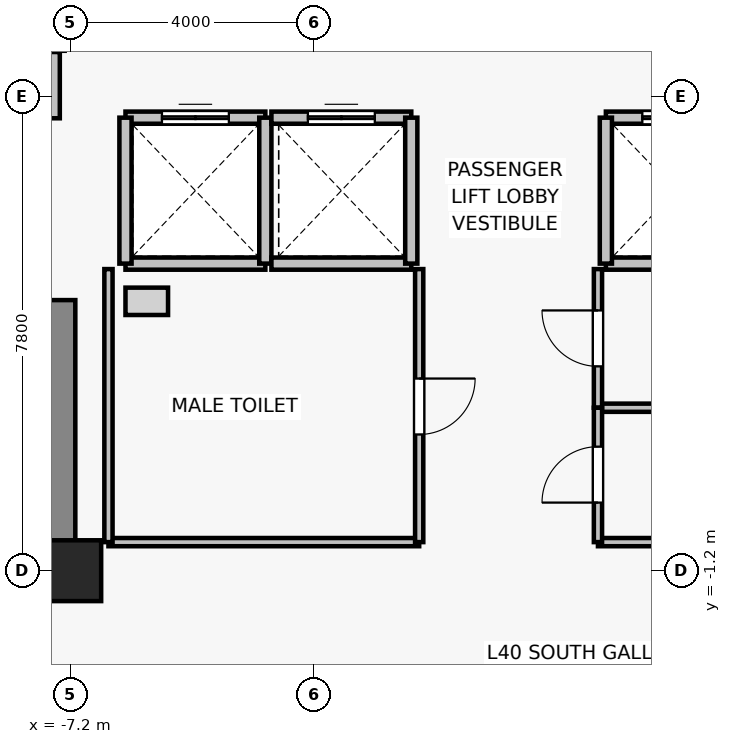
"""IFC4 building model, lengths in metres.
Left out: names, types, materials, properties, quantities, classifications, styles, units other than length and angle.
Written with IfcOpenShell. Run it as: python <this file> out.ifc"""

import sys

from ifc_helpers import new_model, si_unit, direction, frame, frame_2d, origin, origin_2d, place, context, subcontext, project, spatial, rectangle, extrude, source, transform, mapped, element, fill, save


model = new_model("IFC4")
c1 = context("Model", 3, precision=1e-05, world=origin(), true_north=direction((0.0, 1.0)))
c2 = subcontext(c1, "Body", "Model", "MODEL_VIEW")
j1 = project(units=[si_unit("LENGTHUNIT", "METRE"), si_unit("PLANEANGLEUNIT", "RADIAN")], contexts=[c1])
p1 = place(None, origin())
s1 = spatial("IfcSite", under=j1, at=p1, CompositionType="ELEMENT")
p2 = place(p1, origin())
s2 = spatial("IfcBuilding", under=s1, at=p2, CompositionType="ELEMENT")
p3 = place(p2, frame((0.0, 0.0, 146.2)))
s3 = spatial("IfcBuildingStorey", under=s2, at=p3, CompositionType="ELEMENT", Elevation=146.2)
p4 = place(p3, frame((-7.2, -1.2, 0.0), z_axis=(0.0, 0.0, 1.0), x_axis=(1.0, 0.0, 0.0)))
e1 = element("IfcColumn", 1, at=p4, inside=s3, PredefinedType="COLUMN", context=c2, shape_type="SweptSolid", body=[
    extrude(rectangle(XDim=1.0, YDim=1.0, at=origin_2d()), origin(), (0.0, 0.0, 1.0), 3.3),
])
p5 = place(p3, frame((-7.4, -0.825, 0.0), z_axis=(0.0, 0.0, 1.0), x_axis=(0.0, 1.0, 0.0)))
e2 = element("IfcWall", 2, at=p5, inside=s3, PredefinedType="SHEAR", context=c2, shape_type="SweptSolid", body=[
    extrude(rectangle(XDim=4.075, YDim=0.55, at=frame_2d((2.038, 0.0))), origin(), (0.0, 0.0, 1.0), 3.075),
])
p6 = place(p3, frame((-4.0, 3.85, 0.0), z_axis=(0.0, 0.0, 1.0), x_axis=(-1.0, 0.0, 0.0)))
e3 = element("IfcWall", 3, at=p6, inside=s3, PredefinedType="SOLIDWALL", context=c2, shape_type="SweptSolid", body=[
    extrude(rectangle(XDim=2.3, YDim=0.2, at=frame_2d((1.15, 0.0))), origin(), (0.0, 0.0, 1.0), 3.075),
])
p7 = place(p3, frame((-6.3, 6.25, 0.0), z_axis=(0.0, 0.0, 1.0), x_axis=(1.0, 0.0, 0.0)))
e4 = element("IfcWall", 4, at=p7, inside=s3, PredefinedType="SOLIDWALL", context=c2, shape_type="SweptSolid", body=[
    extrude(rectangle(XDim=2.3, YDim=0.2, at=frame_2d((1.15, 0.0))), origin(), (0.0, 0.0, 1.0), 3.075),
])
p8 = place(p7, frame((0.6, 0.0, 0.0)))
e5 = element("IfcOpeningElement", 5, at=p8, cuts=e4, PredefinedType="OPENING", context=c2, shape_type="SweptSolid", body=[
    extrude(rectangle(XDim=1.1, YDim=2.2, at=frame_2d((0.55, 1.1))), frame((0.0, 0.11, 0.0), z_axis=(0.0, -1.0, 0.0), x_axis=(1.0, 0.0, 0.0)), (0.0, 0.0, 1.0), 0.22),
])
for number, where, z_axis, x_axis in (
    (6, (-6.3, 3.85, 0.0), (0.0, 0.0, 1.0), (0.0, 1.0, 0.0)),
    (7, (-4.0, 6.25, 0.0), (0.0, 0.0, 1.0), (0.0, -1.0, 0.0)),
):
    element("IfcWall", number, at=place(p3, frame(where, z_axis=z_axis, x_axis=x_axis)), inside=s3, PredefinedType="SOLIDWALL", context=c2, shape_type="SweptSolid", body=[
        extrude(rectangle(XDim=2.4, YDim=0.2, at=frame_2d((1.2, 0.0))), origin(), (0.0, 0.0, 1.0), 3.075),
    ])
p9 = place(p3, frame((-1.6, 3.85, 0.0), z_axis=(0.0, 0.0, 1.0), x_axis=(-1.0, 0.0, 0.0)))
e8 = element("IfcWall", 8, at=p9, inside=s3, PredefinedType="SOLIDWALL", context=c2, shape_type="SweptSolid", body=[
    extrude(rectangle(XDim=2.3, YDim=0.2, at=frame_2d((1.15, 0.0))), origin(), (0.0, 0.0, 1.0), 3.075),
])
p10 = place(p3, frame((-3.9, 6.25, 0.0), z_axis=(0.0, 0.0, 1.0), x_axis=(1.0, 0.0, 0.0)))
e9 = element("IfcWall", 9, at=p10, inside=s3, PredefinedType="SOLIDWALL", context=c2, shape_type="SweptSolid", body=[
    extrude(rectangle(XDim=2.3, YDim=0.2, at=frame_2d((1.15, 0.0))), origin(), (0.0, 0.0, 1.0), 3.075),
])
p11 = place(p10, frame((0.6, 0.0, 0.0)))
e10 = element("IfcOpeningElement", 10, at=p11, cuts=e9, PredefinedType="OPENING", context=c2, shape_type="SweptSolid", body=[
    extrude(rectangle(XDim=1.1, YDim=2.2, at=frame_2d((0.55, 1.1))), frame((0.0, 0.11, 0.0), z_axis=(0.0, -1.0, 0.0), x_axis=(1.0, 0.0, 0.0)), (0.0, 0.0, 1.0), 0.22),
])
p12 = place(p3, frame((-1.6, 6.25, 0.0), z_axis=(0.0, 0.0, 1.0), x_axis=(0.0, -1.0, 0.0)))
e11 = element("IfcWall", 11, at=p12, inside=s3, PredefinedType="SOLIDWALL", context=c2, shape_type="SweptSolid", body=[
    extrude(rectangle(XDim=2.4, YDim=0.2, at=frame_2d((1.2, 0.0))), origin(), (0.0, 0.0, 1.0), 3.075),
])
p13 = place(p3, frame((3.9, 3.85, 0.0), z_axis=(0.0, 0.0, 1.0), x_axis=(-1.0, 0.0, 0.0)))
e12 = element("IfcWall", 12, at=p13, inside=s3, PredefinedType="SOLIDWALL", context=c2, shape_type="SweptSolid", body=[
    extrude(rectangle(XDim=2.3, YDim=0.2, at=frame_2d((1.15, 0.0))), origin(), (0.0, 0.0, 1.0), 3.075),
])
p14 = place(p3, frame((1.6, 6.25, 0.0), z_axis=(0.0, 0.0, 1.0), x_axis=(1.0, 0.0, 0.0)))
e13 = element("IfcWall", 13, at=p14, inside=s3, PredefinedType="SOLIDWALL", context=c2, shape_type="SweptSolid", body=[
    extrude(rectangle(XDim=2.3, YDim=0.2, at=frame_2d((1.15, 0.0))), origin(), (0.0, 0.0, 1.0), 3.075),
])
p15 = place(p14, frame((0.6, 0.0, 0.0)))
e14 = element("IfcOpeningElement", 14, at=p15, cuts=e13, PredefinedType="OPENING", context=c2, shape_type="SweptSolid", body=[
    extrude(rectangle(XDim=1.1, YDim=2.2, at=frame_2d((0.55, 1.1))), frame((0.0, 0.11, 0.0), z_axis=(0.0, -1.0, 0.0), x_axis=(1.0, 0.0, 0.0)), (0.0, 0.0, 1.0), 0.22),
])
p16 = place(p3, frame((1.6, 3.85, 0.0), z_axis=(0.0, 0.0, 1.0), x_axis=(0.0, 1.0, 0.0)))
e15 = element("IfcWall", 15, at=p16, inside=s3, PredefinedType="SOLIDWALL", context=c2, shape_type="SweptSolid", body=[
    extrude(rectangle(XDim=2.4, YDim=0.2, at=frame_2d((1.2, 0.0))), origin(), (0.0, 0.0, 1.0), 3.075),
])
p17 = place(p3, frame((-7.4, 7.35, 0.0), z_axis=(0.0, 0.0, 1.0), x_axis=(-1.0, 0.0, 0.0)))
e16 = element("IfcWall", 16, at=p17, inside=s3, PredefinedType="SOLIDWALL", context=c2, shape_type="SweptSolid", body=[
    extrude(rectangle(XDim=2.2, YDim=0.2, at=frame_2d((1.1, 0.0))), origin(), (0.0, 0.0, 1.0), 2.565),
])
p18 = place(p3, frame((-7.47, 7.33, 0.0), z_axis=(0.0, 0.0, 1.0), x_axis=(0.0, -1.0, 0.0)))
e17 = element("IfcWall", 17, at=p18, inside=s3, PredefinedType="PARTITIONING", context=c2, shape_type="SweptSolid", body=[
    extrude(rectangle(XDim=1.09, YDim=0.18, at=frame_2d((0.545, 0.0))), origin(), (0.0, 0.0, 1.0), 2.565),
])
p19 = place(p3, frame((-1.47, -0.73, 0.0), z_axis=(0.0, 0.0, 1.0), x_axis=(-1.0, 0.0, 0.0)))
e18 = element("IfcWall", 18, at=p19, inside=s3, PredefinedType="PARTITIONING", context=c2, shape_type="SweptSolid", body=[
    extrude(rectangle(XDim=5.11, YDim=0.135, at=frame_2d((2.555, 0.0))), origin(), (0.0, 0.0, 1.0), 3.075),
])
p20 = place(p3, frame((-6.58, -0.73, 0.0), z_axis=(0.0, 0.0, 1.0), x_axis=(0.0, 1.0, 0.0)))
e19 = element("IfcWall", 19, at=p20, inside=s3, PredefinedType="PARTITIONING", context=c2, shape_type="SweptSolid", body=[
    extrude(rectangle(XDim=4.49, YDim=0.135, at=frame_2d((2.245, 0.0))), origin(), (0.0, 0.0, 1.0), 3.075),
])
p21 = place(p3, frame((-1.47, 3.76, 0.0), z_axis=(0.0, 0.0, 1.0), x_axis=(0.0, -1.0, 0.0)))
e20 = element("IfcWall", 20, at=p21, inside=s3, PredefinedType="PARTITIONING", context=c2, shape_type="SweptSolid", body=[
    extrude(rectangle(XDim=4.49, YDim=0.135, at=frame_2d((2.245, 0.0))), origin(), (0.0, 0.0, 1.0), 3.075),
])
p22 = place(p21, frame((1.8, 0.0, 0.0)))
e21 = element("IfcOpeningElement", 21, at=p22, cuts=e20, PredefinedType="OPENING", context=c2, shape_type="SweptSolid", body=[
    extrude(rectangle(XDim=0.92, YDim=2.1, at=frame_2d((0.46, 1.05))), frame((0.0, 0.077, 0.0), z_axis=(0.0, -1.0, 0.0), x_axis=(1.0, 0.0, 0.0)), (0.0, 0.0, 1.0), 0.155),
])
p23 = place(p3, frame((6.58, 1.48, 0.0), z_axis=(0.0, 0.0, 1.0), x_axis=(-1.0, 0.0, 0.0)))
e22 = element("IfcWall", 22, at=p23, inside=s3, PredefinedType="PARTITIONING", context=c2, shape_type="SweptSolid", body=[
    extrude(rectangle(XDim=5.11, YDim=0.135, at=frame_2d((2.555, 0.0))), origin(), (0.0, 0.0, 1.0), 3.075),
])
p24 = place(p3, frame((1.47, 1.48, 0.0), z_axis=(0.0, 0.0, 1.0), x_axis=(0.0, 1.0, 0.0)))
e23 = element("IfcWall", 23, at=p24, inside=s3, PredefinedType="PARTITIONING", context=c2, shape_type="SweptSolid", body=[
    extrude(rectangle(XDim=2.28, YDim=0.135, at=frame_2d((1.14, 0.0))), origin(), (0.0, 0.0, 1.0), 3.075),
])
p25 = place(p24, frame((0.68, 0.0, 0.0)))
e24 = element("IfcOpeningElement", 24, at=p25, cuts=e23, PredefinedType="OPENING", context=c2, shape_type="SweptSolid", body=[
    extrude(rectangle(XDim=0.92, YDim=2.1, at=frame_2d((0.46, 1.05))), frame((0.0, 0.077, 0.0), z_axis=(0.0, -1.0, 0.0), x_axis=(1.0, 0.0, 0.0)), (0.0, 0.0, 1.0), 0.155),
])
p26 = place(p3, frame((4.18, -0.73, 0.0), z_axis=(0.0, 0.0, 1.0), x_axis=(-1.0, 0.0, 0.0)))
e25 = element("IfcWall", 25, at=p26, inside=s3, PredefinedType="PARTITIONING", context=c2, shape_type="SweptSolid", body=[
    extrude(rectangle(XDim=2.71, YDim=0.135, at=frame_2d((1.355, 0.0))), origin(), (0.0, 0.0, 1.0), 3.075),
])
p27 = place(p3, frame((1.47, -0.73, 0.0), z_axis=(0.0, 0.0, 1.0), x_axis=(0.0, 1.0, 0.0)))
e26 = element("IfcWall", 26, at=p27, inside=s3, PredefinedType="PARTITIONING", context=c2, shape_type="SweptSolid", body=[
    extrude(rectangle(XDim=2.21, YDim=0.135, at=frame_2d((1.105, 0.0))), origin(), (0.0, 0.0, 1.0), 3.075),
])
p28 = place(p27, frame((0.65, 0.0, 0.0)))
e27 = element("IfcOpeningElement", 27, at=p28, cuts=e26, PredefinedType="OPENING", context=c2, shape_type="SweptSolid", body=[
    extrude(rectangle(XDim=0.92, YDim=2.1, at=frame_2d((0.46, 1.05))), frame((0.0, 0.077, 0.0), z_axis=(0.0, -1.0, 0.0), x_axis=(1.0, 0.0, 0.0)), (0.0, 0.0, 1.0), 0.155),
])
m1 = source(origin(), c2, "Body", "SweptSolid", [
    extrude(rectangle(XDim=1.1, YDim=2.2, at=frame_2d((0.55, 1.1))), frame((0.0, 0.025, 0.0), z_axis=(0.0, -1.0, 0.0), x_axis=(1.0, 0.0, 0.0)), (0.0, 0.0, 1.0), 0.05),
])
p29 = place(p8, origin())
e28 = element("IfcDoor", 28, at=p29, inside=s3, OperationType="DOUBLE_DOOR_SLIDING", PredefinedType="DOOR", context=c2, shape_type="MappedRepresentation", body=[
    mapped(m1, transform((0.0, 0.0, 0.0), x_axis=(1.0, 0.0, 0.0), y_axis=(0.0, 1.0, 0.0), z_axis=(0.0, 0.0, 1.0), scale=1.0)),
])
fill(e5, e28)
p30 = place(p11, origin())
e29 = element("IfcDoor", 29, at=p30, inside=s3, OperationType="DOUBLE_DOOR_SLIDING", PredefinedType="DOOR", context=c2, shape_type="MappedRepresentation", body=[
    mapped(m1, transform((0.0, 0.0, 0.0), x_axis=(1.0, 0.0, 0.0), y_axis=(0.0, 1.0, 0.0), z_axis=(0.0, 0.0, 1.0), scale=1.0)),
])
fill(e10, e29)
p31 = place(p15, origin())
e30 = element("IfcDoor", 30, at=p31, inside=s3, OperationType="DOUBLE_DOOR_SLIDING", PredefinedType="DOOR", context=c2, shape_type="MappedRepresentation", body=[
    mapped(m1, transform((0.0, 0.0, 0.0), x_axis=(1.0, 0.0, 0.0), y_axis=(0.0, 1.0, 0.0), z_axis=(0.0, 0.0, 1.0), scale=1.0)),
])
fill(e14, e30)
m2 = source(origin(), c2, "Body", "SweptSolid", [
    extrude(rectangle(XDim=0.92, YDim=2.1, at=frame_2d((0.46, 1.05))), frame((0.0, 0.025, 0.0), z_axis=(0.0, -1.0, 0.0), x_axis=(1.0, 0.0, 0.0)), (0.0, 0.0, 1.0), 0.05),
])
p32 = place(p22, origin())
e31 = element("IfcDoor", 31, at=p32, inside=s3, OperationType="SINGLE_SWING_LEFT", PredefinedType="DOOR", context=c2, shape_type="MappedRepresentation", body=[
    mapped(m2, transform((0.0, 0.0, 0.0), x_axis=(1.0, 0.0, 0.0), y_axis=(0.0, 1.0, 0.0), z_axis=(0.0, 0.0, 1.0), scale=1.0)),
])
fill(e21, e31)
p33 = place(p25, origin())
e32 = element("IfcDoor", 32, at=p33, inside=s3, OperationType="SINGLE_SWING_RIGHT", PredefinedType="DOOR", context=c2, shape_type="MappedRepresentation", body=[
    mapped(m2, transform((0.0, 0.0, 0.0), x_axis=(1.0, 0.0, 0.0), y_axis=(0.0, 1.0, 0.0), z_axis=(0.0, 0.0, 1.0), scale=1.0)),
])
fill(e24, e32)
p34 = place(p28, origin())
e33 = element("IfcDoor", 33, at=p34, inside=s3, OperationType="SINGLE_SWING_LEFT", PredefinedType="DOOR", context=c2, shape_type="MappedRepresentation", body=[
    mapped(m2, transform((0.0, 0.0, 0.0), x_axis=(1.0, 0.0, 0.0), y_axis=(0.0, 1.0, 0.0), z_axis=(0.0, 0.0, 1.0), scale=1.0)),
])
fill(e27, e33)
save(model, sys.argv[1])
